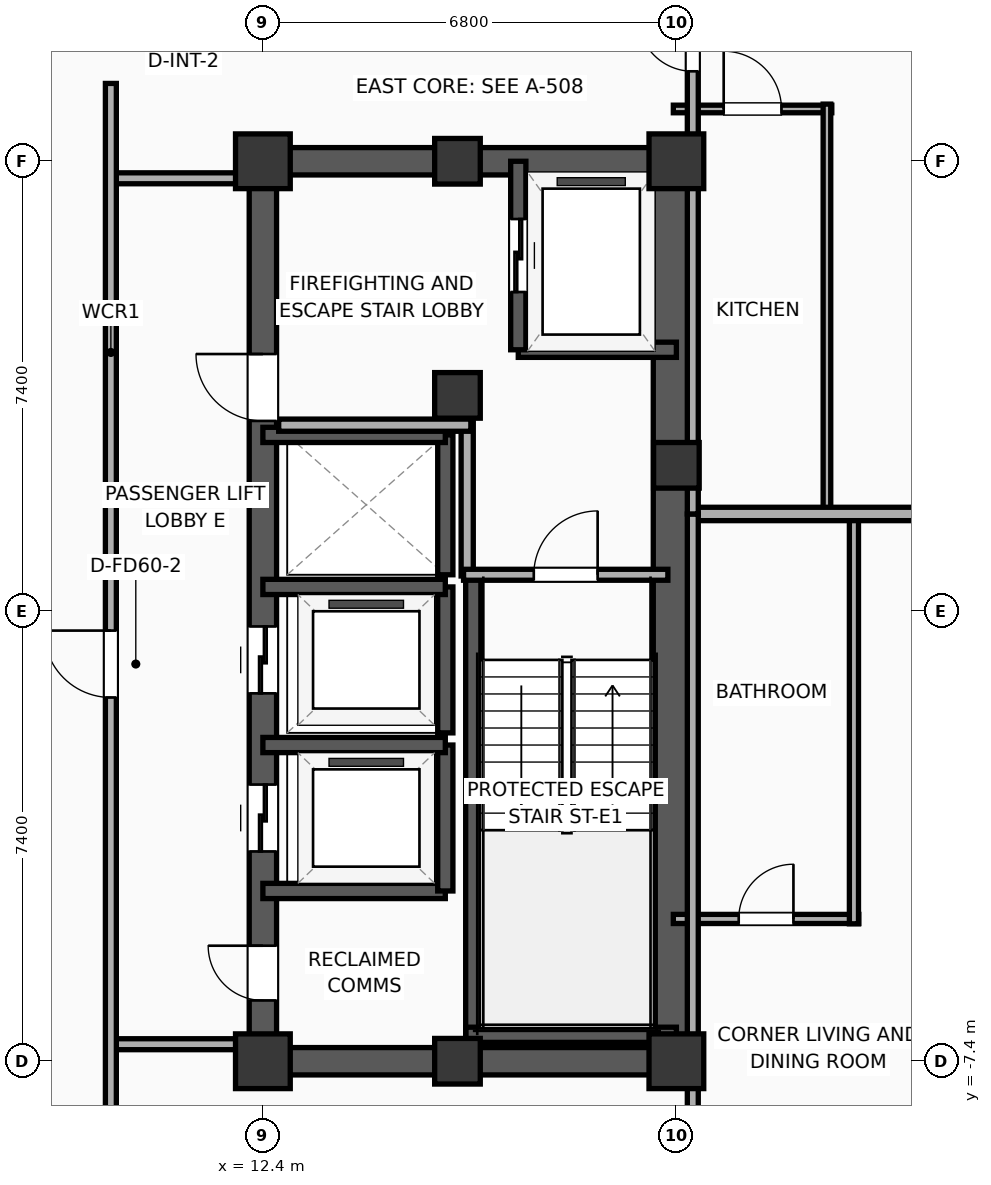
"""IFC4 building model, lengths in metres.
Left out: names, types, materials, properties, quantities, classifications, styles, units other than length and angle.
Written with IfcOpenShell. Run it as: python <this file> out.ifc"""

import sys

from ifc_helpers import new_model, si_unit, direction, frame, frame_2d, origin, origin_2d, place, context, subcontext, project, spatial, rectangle, extrude, element, fill, save


model = new_model("IFC4")
c1 = context("Model", 3, precision=1e-05, world=origin(), true_north=direction((0.0, 1.0)))
c2 = subcontext(c1, "Body", "Model", "MODEL_VIEW")
j1 = project(units=[si_unit("LENGTHUNIT", "METRE"), si_unit("PLANEANGLEUNIT", "RADIAN")], contexts=[c1])
p1 = place(None, origin())
s1 = spatial("IfcSite", under=j1, at=p1, CompositionType="ELEMENT")
p2 = place(p1, origin())
s2 = spatial("IfcBuilding", under=s1, at=p2, CompositionType="ELEMENT")
p3 = place(p2, frame((0.0, 0.0, 191.1)))
s3 = spatial("IfcBuildingStorey", under=s2, at=p3, CompositionType="ELEMENT", Elevation=191.1)
p4 = place(p3, frame((12.4, -7.4, 0.0), z_axis=(0.0, 0.0, 1.0), x_axis=(1.0, 0.0, 0.0)))
e1 = element("IfcColumn", 1, at=p4, inside=s3, PredefinedType="COLUMN", context=c2, shape_type="SweptSolid", body=[
    extrude(rectangle(XDim=0.9, YDim=0.9, at=origin_2d()), origin(), (0.0, 0.0, 1.0), 3.9),
])
p5 = place(p3, frame((15.6, 3.55, 0.0), z_axis=(0.0, 0.0, 1.0), x_axis=(1.0, 0.0, 0.0)))
e2 = element("IfcColumn", 2, at=p5, inside=s3, PredefinedType="COLUMN", context=c2, shape_type="SweptSolid", body=[
    extrude(rectangle(XDim=0.75, YDim=0.75, at=origin_2d()), origin(), (0.0, 0.0, 1.0), 3.9),
])
p6 = place(p3, frame((12.4, 7.4, 0.0), z_axis=(0.0, 0.0, 1.0), x_axis=(1.0, 0.0, 0.0)))
e3 = element("IfcColumn", 3, at=p6, inside=s3, PredefinedType="COLUMN", context=c2, shape_type="SweptSolid", body=[
    extrude(rectangle(XDim=0.9, YDim=0.9, at=origin_2d()), origin(), (0.0, 0.0, 1.0), 3.9),
])
for number, where, z_axis, x_axis in (
    (4, (15.6, -7.4, 0.0), (0.0, 0.0, 1.0), (1.0, 0.0, 0.0)),
    (5, (15.6, 7.4, 0.0), (0.0, 0.0, 1.0), (1.0, 0.0, 0.0)),
):
    element("IfcColumn", number, at=place(p3, frame(where, z_axis=z_axis, x_axis=x_axis)), inside=s3, PredefinedType="COLUMN", context=c2, shape_type="SweptSolid", body=[
        extrude(rectangle(XDim=0.75, YDim=0.75, at=origin_2d()), origin(), (0.0, 0.0, 1.0), 3.9),
    ])
p7 = place(p3, frame((19.2, -7.4, 0.0), z_axis=(0.0, 0.0, 1.0), x_axis=(1.0, 0.0, 0.0)))
e6 = element("IfcColumn", 6, at=p7, inside=s3, PredefinedType="COLUMN", context=c2, shape_type="SweptSolid", body=[
    extrude(rectangle(XDim=0.9, YDim=0.9, at=origin_2d()), origin(), (0.0, 0.0, 1.0), 3.9),
])
p8 = place(p3, frame((19.2, 2.4, 0.0), z_axis=(0.0, 0.0, 1.0), x_axis=(1.0, 0.0, 0.0)))
e7 = element("IfcColumn", 7, at=p8, inside=s3, PredefinedType="COLUMN", context=c2, shape_type="SweptSolid", body=[
    extrude(rectangle(XDim=0.75, YDim=0.75, at=origin_2d()), origin(), (0.0, 0.0, 1.0), 3.9),
])
p9 = place(p3, frame((19.2, 7.4, 0.0), z_axis=(0.0, 0.0, 1.0), x_axis=(1.0, 0.0, 0.0)))
e8 = element("IfcColumn", 8, at=p9, inside=s3, PredefinedType="COLUMN", context=c2, shape_type="SweptSolid", body=[
    extrude(rectangle(XDim=0.9, YDim=0.9, at=origin_2d()), origin(), (0.0, 0.0, 1.0), 3.9),
])
for number, where, z_axis, x_axis in (
    (9, (12.175, -7.4, 0.0), (0.0, 0.0, 1.0), (1.0, 0.0, 0.0)),
    (10, (12.175, 7.4, 0.0), (0.0, 0.0, 1.0), (1.0, 0.0, 0.0)),
):
    element("IfcWall", number, at=place(p3, frame(where, z_axis=z_axis, x_axis=x_axis)), inside=s3, PredefinedType="SHEAR", context=c2, shape_type="SweptSolid", body=[
        extrude(rectangle(XDim=7.25, YDim=0.45, at=frame_2d((3.625, 0.0))), origin(), (0.0, 0.0, 1.0), 3.5),
    ])
p10 = place(p3, frame((12.4, -7.4, 0.0), z_axis=(0.0, 0.0, 1.0), x_axis=(0.0, 1.0, 0.0)))
e11 = element("IfcWall", 11, at=p10, inside=s3, PredefinedType="SHEAR", context=c2, shape_type="SweptSolid", body=[
    extrude(rectangle(XDim=14.8, YDim=0.45, at=frame_2d((7.4, 0.0))), origin(), (0.0, 0.0, 1.0), 3.5),
])
p11 = place(p10, frame((3.45, 0.0, 0.0)))
e12 = element("IfcOpeningElement", 12, at=p11, cuts=e11, PredefinedType="OPENING", context=c2, shape_type="SweptSolid", body=[
    extrude(rectangle(XDim=1.1, YDim=2.05, at=frame_2d((0.55, 1.025))), frame((0.0, 0.235, 0.0), z_axis=(0.0, -1.0, 0.0), x_axis=(1.0, 0.0, 0.0)), (0.0, 0.0, 1.0), 0.47),
])
p12 = place(p10, frame((6.05, 0.0, 0.0)))
e13 = element("IfcOpeningElement", 13, at=p12, cuts=e11, PredefinedType="OPENING", context=c2, shape_type="SweptSolid", body=[
    extrude(rectangle(XDim=1.1, YDim=2.05, at=frame_2d((0.55, 1.025))), frame((0.0, 0.235, 0.0), z_axis=(0.0, -1.0, 0.0), x_axis=(1.0, 0.0, 0.0)), (0.0, 0.0, 1.0), 0.47),
])
p13 = place(p10, frame((10.53, 0.0, 0.0)))
e14 = element("IfcOpeningElement", 14, at=p13, cuts=e11, PredefinedType="OPENING", context=c2, shape_type="SweptSolid", body=[
    extrude(rectangle(XDim=1.1, YDim=2.05, at=frame_2d((0.55, 1.025))), frame((0.0, 0.235, 0.0), z_axis=(0.0, -1.0, 0.0), x_axis=(1.0, 0.0, 0.0)), (0.0, 0.0, 1.0), 0.47),
])
p14 = place(p10, frame((1.0, 0.0, 0.0)))
e15 = element("IfcOpeningElement", 15, at=p14, cuts=e11, PredefinedType="OPENING", context=c2, shape_type="SweptSolid", body=[
    extrude(rectangle(XDim=0.9, YDim=2.05, at=frame_2d((0.45, 1.025))), frame((0.0, 0.235, 0.0), z_axis=(0.0, -1.0, 0.0), x_axis=(1.0, 0.0, 0.0)), (0.0, 0.0, 1.0), 0.47),
])
p15 = place(p3, frame((19.145, -7.4, 0.0), z_axis=(0.0, 0.0, 1.0), x_axis=(0.0, 1.0, 0.0)))
e16 = element("IfcWall", 16, at=p15, inside=s3, PredefinedType="SHEAR", context=c2, shape_type="SweptSolid", body=[
    extrude(rectangle(XDim=14.8, YDim=0.65, at=frame_2d((7.4, 0.0))), origin(), (0.0, 0.0, 1.0), 3.5),
])
p16 = place(p3, frame((15.86, -7.085, 0.0), z_axis=(0.0, 0.0, 1.0), x_axis=(0.0, 1.0, 0.0)))
e17 = element("IfcWall", 17, at=p16, inside=s3, PredefinedType="SOLIDWALL", context=c2, shape_type="SweptSolid", body=[
    extrude(rectangle(XDim=7.685, YDim=0.25, at=frame_2d((3.843, 0.0))), origin(), (0.0, 0.0, 1.0), 3.5),
])
p17 = place(p3, frame((15.74, -6.965, 0.0), z_axis=(0.0, 0.0, 1.0), x_axis=(1.0, 0.0, 0.0)))
e18 = element("IfcWall", 18, at=p17, inside=s3, PredefinedType="SOLIDWALL", context=c2, shape_type="SweptSolid", body=[
    extrude(rectangle(XDim=3.46, YDim=0.25, at=frame_2d((1.73, 0.0))), origin(), (0.0, 0.0, 1.0), 3.5),
])
p18 = place(p3, frame((16.6, 4.3, 0.0), z_axis=(0.0, 0.0, 1.0), x_axis=(1.0, 0.0, 0.0)))
e19 = element("IfcWall", 19, at=p18, inside=s3, PredefinedType="SOLIDWALL", context=c2, shape_type="SweptSolid", body=[
    extrude(rectangle(XDim=2.6, YDim=0.25, at=frame_2d((1.3, 0.0))), origin(), (0.0, 0.0, 1.0), 3.5),
])
p19 = place(p3, frame((16.6, 7.4, 0.0), z_axis=(0.0, 0.0, 1.0), x_axis=(0.0, -1.0, 0.0)))
e20 = element("IfcWall", 20, at=p19, inside=s3, PredefinedType="SOLIDWALL", context=c2, shape_type="SweptSolid", body=[
    extrude(rectangle(XDim=3.1, YDim=0.25, at=frame_2d((1.55, 0.0))), origin(), (0.0, 0.0, 1.0), 3.5),
])
p20 = place(p19, frame((0.95, 0.0, 0.0)))
e21 = element("IfcOpeningElement", 21, at=p20, cuts=e20, PredefinedType="OPENING", context=c2, shape_type="SweptSolid", body=[
    extrude(rectangle(XDim=1.2, YDim=2.05, at=frame_2d((0.6, 1.025))), frame((0.0, 0.135, 0.0), z_axis=(0.0, -1.0, 0.0), x_axis=(1.0, 0.0, 0.0)), (0.0, 0.0, 1.0), 0.27),
])
p21 = place(p3, frame((12.4, -4.6, 0.0), z_axis=(0.0, 0.0, 1.0), x_axis=(1.0, 0.0, 0.0)))
e22 = element("IfcWall", 22, at=p21, inside=s3, PredefinedType="SOLIDWALL", context=c2, shape_type="SweptSolid", body=[
    extrude(rectangle(XDim=3.0, YDim=0.25, at=frame_2d((1.5, 0.0))), origin(), (0.0, 0.0, 1.0), 3.5),
])
p22 = place(p3, frame((15.4, -4.6, 0.0), z_axis=(0.0, 0.0, 1.0), x_axis=(0.0, 1.0, 0.0)))
e23 = element("IfcWall", 23, at=p22, inside=s3, PredefinedType="SOLIDWALL", context=c2, shape_type="SweptSolid", body=[
    extrude(rectangle(XDim=2.4, YDim=0.25, at=frame_2d((1.2, 0.0))), origin(), (0.0, 0.0, 1.0), 3.5),
])
p23 = place(p3, frame((15.4, -2.2, 0.0), z_axis=(0.0, 0.0, 1.0), x_axis=(-1.0, 0.0, 0.0)))
e24 = element("IfcWall", 24, at=p23, inside=s3, PredefinedType="SOLIDWALL", context=c2, shape_type="SweptSolid", body=[
    extrude(rectangle(XDim=3.0, YDim=0.25, at=frame_2d((1.5, 0.0))), origin(), (0.0, 0.0, 1.0), 3.5),
])
p24 = place(p3, frame((15.4, -2.0, 0.0), z_axis=(0.0, 0.0, 1.0), x_axis=(0.0, 1.0, 0.0)))
e25 = element("IfcWall", 25, at=p24, inside=s3, PredefinedType="SOLIDWALL", context=c2, shape_type="SweptSolid", body=[
    extrude(rectangle(XDim=2.4, YDim=0.25, at=frame_2d((1.2, 0.0))), origin(), (0.0, 0.0, 1.0), 3.5),
])
p25 = place(p3, frame((15.4, 0.4, 0.0), z_axis=(0.0, 0.0, 1.0), x_axis=(-1.0, 0.0, 0.0)))
e26 = element("IfcWall", 26, at=p25, inside=s3, PredefinedType="SOLIDWALL", context=c2, shape_type="SweptSolid", body=[
    extrude(rectangle(XDim=3.0, YDim=0.25, at=frame_2d((1.5, 0.0))), origin(), (0.0, 0.0, 1.0), 3.5),
])
p26 = place(p3, frame((15.4, 0.6, 0.0), z_axis=(0.0, 0.0, 1.0), x_axis=(0.0, 1.0, 0.0)))
e27 = element("IfcWall", 27, at=p26, inside=s3, PredefinedType="SOLIDWALL", context=c2, shape_type="SweptSolid", body=[
    extrude(rectangle(XDim=2.3, YDim=0.25, at=frame_2d((1.15, 0.0))), origin(), (0.0, 0.0, 1.0), 3.5),
])
p27 = place(p3, frame((15.4, 2.9, 0.0), z_axis=(0.0, 0.0, 1.0), x_axis=(-1.0, 0.0, 0.0)))
e28 = element("IfcWall", 28, at=p27, inside=s3, PredefinedType="SOLIDWALL", context=c2, shape_type="SweptSolid", body=[
    extrude(rectangle(XDim=3.0, YDim=0.25, at=frame_2d((1.5, 0.0))), origin(), (0.0, 0.0, 1.0), 3.5),
])
p28 = place(p3, frame((15.76, 0.58, 0.0), z_axis=(0.0, 0.0, 1.0), x_axis=(0.0, 1.0, 0.0)))
e29 = element("IfcWall", 29, at=p28, inside=s3, PredefinedType="PARTITIONING", context=c2, shape_type="SweptSolid", body=[
    extrude(rectangle(XDim=2.52, YDim=0.2, at=frame_2d((1.26, 0.0))), origin(), (0.0, 0.0, 1.0), 3.5),
])
p29 = place(p3, frame((12.66, 3.06, 0.0), z_axis=(0.0, 0.0, 1.0), x_axis=(1.0, 0.0, 0.0)))
e30 = element("IfcWall", 30, at=p29, inside=s3, PredefinedType="PARTITIONING", context=c2, shape_type="SweptSolid", body=[
    extrude(rectangle(XDim=3.16, YDim=0.2, at=frame_2d((1.58, 0.0))), origin(), (0.0, 0.0, 1.0), 3.5),
])
p30 = place(p3, frame((15.7, 0.6, 0.0), z_axis=(0.0, 0.0, 1.0), x_axis=(1.0, 0.0, 0.0)))
e31 = element("IfcWall", 31, at=p30, inside=s3, PredefinedType="PARTITIONING", context=c2, shape_type="SweptSolid", body=[
    extrude(rectangle(XDim=3.36, YDim=0.18, at=frame_2d((1.68, 0.0))), origin(), (0.0, 0.0, 1.0), 3.5),
])
p31 = place(p30, frame((1.155, 0.0, 0.0)))
e32 = element("IfcOpeningElement", 32, at=p31, cuts=e31, PredefinedType="OPENING", context=c2, shape_type="SweptSolid", body=[
    extrude(rectangle(XDim=1.05, YDim=2.05, at=frame_2d((0.525, 1.025))), frame((0.0, 0.1, 0.0), z_axis=(0.0, -1.0, 0.0), x_axis=(1.0, 0.0, 0.0)), (0.0, 0.0, 1.0), 0.2),
])
for number, where, z_axis, x_axis in (
    (33, (9.88, 7.12, 0.0), (0.0, 0.0, 1.0), (1.0, 0.0, 0.0)),
    (34, (9.88, -7.12, 0.0), (0.0, 0.0, 1.0), (1.0, 0.0, 0.0)),
):
    element("IfcWall", number, at=place(p3, frame(where, z_axis=z_axis, x_axis=x_axis)), inside=s3, PredefinedType="PARTITIONING", context=c2, shape_type="SweptSolid", body=[
        extrude(rectangle(XDim=2.27, YDim=0.18, at=frame_2d((1.135, 0.0))), origin(), (0.0, 0.0, 1.0), 2.54),
    ])
p32 = place(p3, frame((9.9, -8.68, 0.0), z_axis=(0.0, 0.0, 1.0), x_axis=(0.0, 1.0, 0.0)))
e35 = element("IfcWall", 35, at=p32, inside=s3, PredefinedType="PARTITIONING", context=c2, shape_type="SweptSolid", body=[
    extrude(rectangle(XDim=17.36, YDim=0.18, at=frame_2d((8.68, 0.0))), origin(), (0.0, 0.0, 1.0), 3.5),
])
p33 = place(p32, frame((7.262, 0.0, 0.0)))
e36 = element("IfcOpeningElement", 36, at=p33, cuts=e35, PredefinedType="OPENING", context=c2, shape_type="SweptSolid", body=[
    extrude(rectangle(XDim=1.1, YDim=2.05, at=frame_2d((0.55, 1.025))), frame((0.0, 0.1, 0.0), z_axis=(0.0, -1.0, 0.0), x_axis=(1.0, 0.0, 0.0)), (0.0, 0.0, 1.0), 0.2),
])
p34 = place(p3, frame((19.15, -5.06, 0.0), z_axis=(0.0, 0.0, 1.0), x_axis=(1.0, 0.0, 0.0)))
e37 = element("IfcWall", 37, at=p34, inside=s3, PredefinedType="PLUMBINGWALL", context=c2, shape_type="SweptSolid", body=[
    extrude(rectangle(XDim=3.05, YDim=0.15, at=frame_2d((1.525, 0.0))), origin(), (0.0, 0.0, 1.0), 3.5),
])
p35 = place(p34, frame((1.075, 0.0, 0.0)))
e38 = element("IfcOpeningElement", 38, at=p35, cuts=e37, PredefinedType="OPENING", context=c2, shape_type="SweptSolid", body=[
    extrude(rectangle(XDim=0.9, YDim=2.05, at=frame_2d((0.45, 1.025))), frame((0.0, 0.085, 0.0), z_axis=(0.0, -1.0, 0.0), x_axis=(1.0, 0.0, 0.0)), (0.0, 0.0, 1.0), 0.17),
])
p36 = place(p3, frame((22.12, -5.14, 0.0), z_axis=(0.0, 0.0, 1.0), x_axis=(0.0, 1.0, 0.0)))
e39 = element("IfcWall", 39, at=p36, inside=s3, PredefinedType="PLUMBINGWALL", context=c2, shape_type="SweptSolid", body=[
    extrude(rectangle(XDim=6.72, YDim=0.15, at=frame_2d((3.36, 0.0))), origin(), (0.0, 0.0, 1.0), 3.5),
])
p37 = place(p3, frame((19.15, 8.26, 0.0), z_axis=(0.0, 0.0, 1.0), x_axis=(1.0, 0.0, 0.0)))
e40 = element("IfcWall", 40, at=p37, inside=s3, PredefinedType="PARTITIONING", context=c2, shape_type="SweptSolid", body=[
    extrude(rectangle(XDim=2.606, YDim=0.125, at=frame_2d((1.303, 0.0))), origin(), (0.0, 0.0, 1.0), 2.39),
])
p38 = place(p37, frame((0.828, 0.0, 0.0)))
e41 = element("IfcOpeningElement", 41, at=p38, cuts=e40, PredefinedType="OPENING", context=c2, shape_type="SweptSolid", body=[
    extrude(rectangle(XDim=0.95, YDim=2.05, at=frame_2d((0.475, 1.025))), frame((0.0, 0.073, 0.0), z_axis=(0.0, -1.0, 0.0), x_axis=(1.0, 0.0, 0.0)), (0.0, 0.0, 1.0), 0.145),
])
p39 = place(p3, frame((21.676, 1.62, 0.0), z_axis=(0.0, 0.0, 1.0), x_axis=(0.0, 1.0, 0.0)))
e42 = element("IfcWall", 42, at=p39, inside=s3, PredefinedType="PARTITIONING", context=c2, shape_type="SweptSolid", body=[
    extrude(rectangle(XDim=6.72, YDim=0.125, at=frame_2d((3.36, 0.0))), origin(), (0.0, 0.0, 1.0), 3.5),
])
p40 = place(p3, frame((19.47, 1.6, 0.0), z_axis=(0.0, 0.0, 1.0), x_axis=(1.0, 0.0, 0.0)))
e43 = element("IfcWall", 43, at=p40, inside=s3, PredefinedType="PARTITIONING", context=c2, shape_type="SweptSolid", body=[
    extrude(rectangle(XDim=6.892, YDim=0.22, at=frame_2d((3.446, 0.0))), origin(), (0.0, 0.0, 1.0), 3.5),
])
p41 = place(p3, frame((19.47, -18.559, 0.0), z_axis=(0.0, 0.0, 1.0), x_axis=(0.0, 1.0, 0.0)))
e44 = element("IfcWall", 44, at=p41, inside=s3, PredefinedType="PARTITIONING", context=c2, shape_type="SweptSolid", body=[
    extrude(rectangle(XDim=20.159, YDim=0.18, at=frame_2d((10.079, 0.0))), origin(), (0.0, 0.0, 1.0), 3.5),
])
p42 = place(p41, frame((8.779, 0.0, 0.0)))
e45 = element("IfcOpeningElement", 45, at=p42, cuts=e44, PredefinedType="OPENING", context=c2, shape_type="SweptSolid", body=[
    extrude(rectangle(XDim=0.9, YDim=2.05, at=frame_2d((0.45, 1.025))), frame((0.0, 0.1, 0.0), z_axis=(0.0, -1.0, 0.0), x_axis=(1.0, 0.0, 0.0)), (0.0, 0.0, 1.0), 0.2),
])
p43 = place(p3, frame((19.47, 1.6, 0.0), z_axis=(0.0, 0.0, 1.0), x_axis=(0.0, 1.0, 0.0)))
e46 = element("IfcWall", 46, at=p43, inside=s3, PredefinedType="PARTITIONING", context=c2, shape_type="SweptSolid", body=[
    extrude(rectangle(XDim=20.524, YDim=0.18, at=frame_2d((10.262, 0.0))), origin(), (0.0, 0.0, 1.0), 3.5),
])
p44 = place(p43, frame((7.279, 0.0, 0.0)))
e47 = element("IfcOpeningElement", 47, at=p44, cuts=e46, PredefinedType="OPENING", context=c2, shape_type="SweptSolid", body=[
    extrude(rectangle(XDim=0.9, YDim=2.05, at=frame_2d((0.45, 1.025))), frame((0.0, 0.1, 0.0), z_axis=(0.0, -1.0, 0.0), x_axis=(1.0, 0.0, 0.0)), (0.0, 0.0, 1.0), 0.2),
])
p45 = place(p20, origin())
e48 = element("IfcDoor", 48, at=p45, inside=s3, OperationType="SLIDING_TO_LEFT", PredefinedType="DOOR", context=c2, shape_type="SweptSolid", body=[
    extrude(rectangle(XDim=1.2, YDim=2.05, at=frame_2d((0.6, 1.025))), frame((0.0, 0.025, 0.0), z_axis=(0.0, -1.0, 0.0), x_axis=(1.0, 0.0, 0.0)), (0.0, 0.0, 1.0), 0.05),
])
fill(e21, e48)
p46 = place(p11, origin())
e49 = element("IfcDoor", 49, at=p46, inside=s3, OperationType="SLIDING_TO_LEFT", PredefinedType="DOOR", context=c2, shape_type="SweptSolid", body=[
    extrude(rectangle(XDim=1.1, YDim=2.05, at=frame_2d((0.55, 1.025))), frame((0.0, 0.025, 0.0), z_axis=(0.0, -1.0, 0.0), x_axis=(1.0, 0.0, 0.0)), (0.0, 0.0, 1.0), 0.05),
])
fill(e12, e49)
p47 = place(p12, origin())
e50 = element("IfcDoor", 50, at=p47, inside=s3, OperationType="SLIDING_TO_LEFT", PredefinedType="DOOR", context=c2, shape_type="SweptSolid", body=[
    extrude(rectangle(XDim=1.1, YDim=2.05, at=frame_2d((0.55, 1.025))), frame((0.0, 0.025, 0.0), z_axis=(0.0, -1.0, 0.0), x_axis=(1.0, 0.0, 0.0)), (0.0, 0.0, 1.0), 0.05),
])
fill(e13, e50)
p48 = place(p31, origin())
e51 = element("IfcDoor", 51, at=p48, inside=s3, OperationType="SINGLE_SWING_RIGHT", PredefinedType="DOOR", context=c2, shape_type="SweptSolid", body=[
    extrude(rectangle(XDim=1.05, YDim=2.05, at=frame_2d((0.525, 1.025))), frame((0.0, 0.025, 0.0), z_axis=(0.0, -1.0, 0.0), x_axis=(1.0, 0.0, 0.0)), (0.0, 0.0, 1.0), 0.05),
])
fill(e32, e51)
p49 = place(p33, origin())
e52 = element("IfcDoor", 52, at=p49, inside=s3, OperationType="SINGLE_SWING_RIGHT", PredefinedType="DOOR", context=c2, shape_type="SweptSolid", body=[
    extrude(rectangle(XDim=1.1, YDim=2.05, at=frame_2d((0.55, 1.025))), frame((0.0, 0.025, 0.0), z_axis=(0.0, -1.0, 0.0), x_axis=(1.0, 0.0, 0.0)), (0.0, 0.0, 1.0), 0.05),
])
fill(e36, e52)
p50 = place(p35, origin())
e53 = element("IfcDoor", 53, at=p50, inside=s3, OperationType="SINGLE_SWING_RIGHT", PredefinedType="DOOR", context=c2, shape_type="SweptSolid", body=[
    extrude(rectangle(XDim=0.9, YDim=2.05, at=frame_2d((0.45, 1.025))), frame((0.0, 0.025, 0.0), z_axis=(0.0, -1.0, 0.0), x_axis=(1.0, 0.0, 0.0)), (0.0, 0.0, 1.0), 0.05),
])
fill(e38, e53)
p51 = place(p38, origin())
e54 = element("IfcDoor", 54, at=p51, inside=s3, OperationType="SINGLE_SWING_LEFT", PredefinedType="DOOR", context=c2, shape_type="SweptSolid", body=[
    extrude(rectangle(XDim=0.95, YDim=2.05, at=frame_2d((0.475, 1.025))), frame((0.0, 0.025, 0.0), z_axis=(0.0, -1.0, 0.0), x_axis=(1.0, 0.0, 0.0)), (0.0, 0.0, 1.0), 0.05),
])
fill(e41, e54)
p52 = place(p44, origin())
e55 = element("IfcDoor", 55, at=p52, inside=s3, OperationType="SINGLE_SWING_RIGHT", PredefinedType="DOOR", context=c2, shape_type="SweptSolid", body=[
    extrude(rectangle(XDim=0.9, YDim=2.05, at=frame_2d((0.45, 1.025))), frame((0.0, 0.025, 0.0), z_axis=(0.0, -1.0, 0.0), x_axis=(1.0, 0.0, 0.0)), (0.0, 0.0, 1.0), 0.05),
])
fill(e47, e55)
p53 = place(p13, origin())
e56 = element("IfcDoor", 56, at=p53, inside=s3, OperationType="SINGLE_SWING_RIGHT", PredefinedType="DOOR", context=c2, shape_type="SweptSolid", body=[
    extrude(rectangle(XDim=1.1, YDim=2.05, at=frame_2d((0.55, 1.025))), frame((0.0, 0.025, 0.0), z_axis=(0.0, -1.0, 0.0), x_axis=(1.0, 0.0, 0.0)), (0.0, 0.0, 1.0), 0.05),
])
fill(e14, e56)
p54 = place(p14, origin())
e57 = element("IfcDoor", 57, at=p54, inside=s3, OperationType="SINGLE_SWING_RIGHT", PredefinedType="DOOR", context=c2, shape_type="SweptSolid", body=[
    extrude(rectangle(XDim=0.9, YDim=2.05, at=frame_2d((0.45, 1.025))), frame((0.0, 0.025, 0.0), z_axis=(0.0, -1.0, 0.0), x_axis=(1.0, 0.0, 0.0)), (0.0, 0.0, 1.0), 0.05),
])
fill(e15, e57)
save(model, sys.argv[1])
